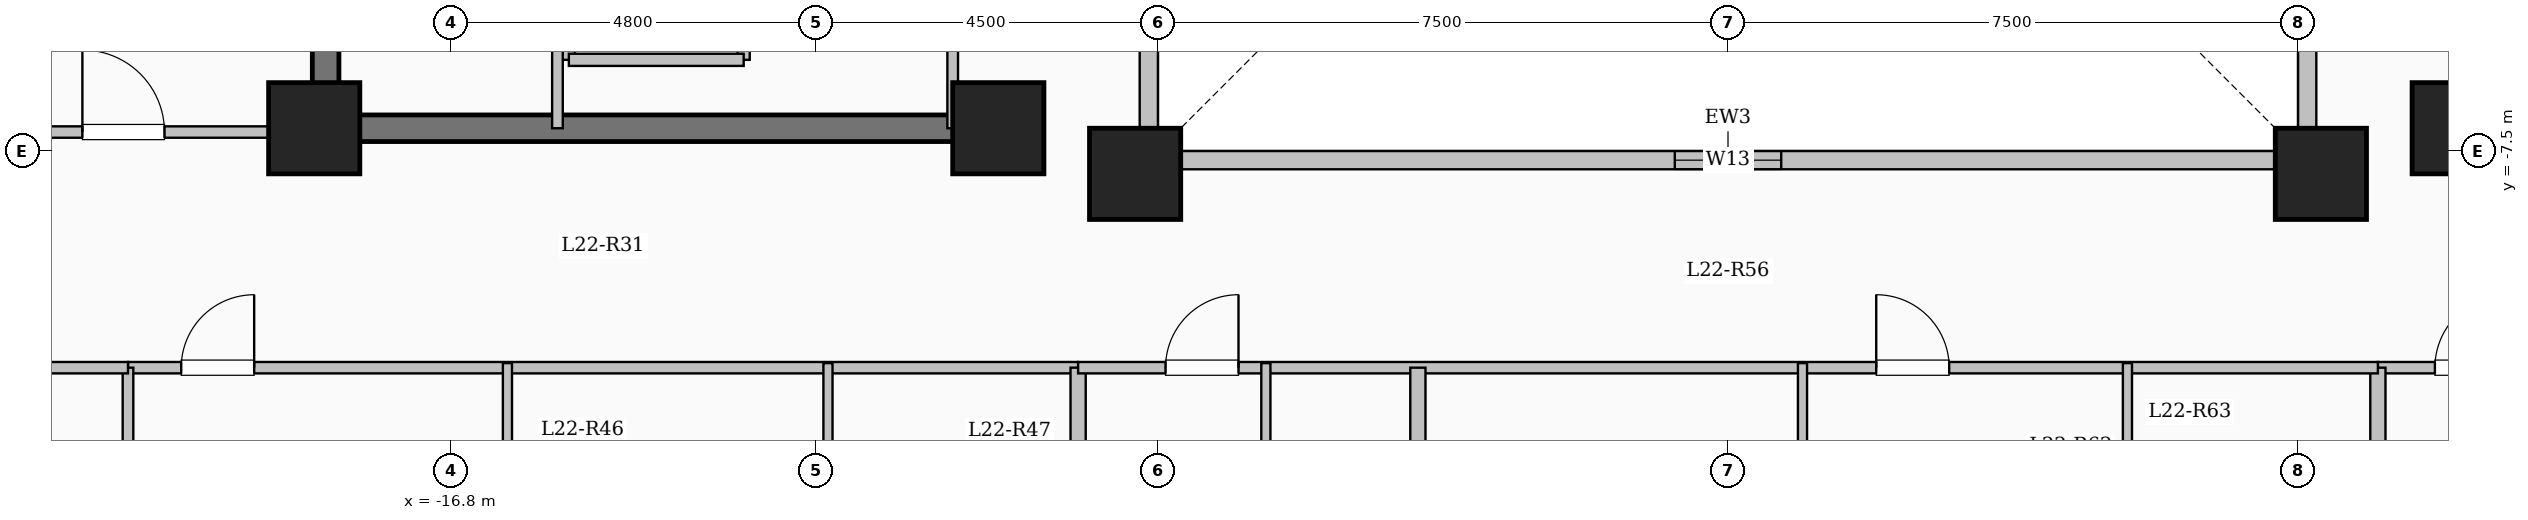
"""IFC4 building model, lengths in metres.
Left out: names, types, materials, properties, quantities, classifications, styles, units other than length and angle.
Written with IfcOpenShell. Run it as: python <this file> out.ifc"""

import sys

from ifc_helpers import new_model, si_unit, direction, frame, frame_2d, origin, origin_2d, place, context, subcontext, project, spatial, rectangle, extrude, element, fill, save


model = new_model("IFC4")
c1 = context("Model", 3, precision=1e-05, world=origin(), true_north=direction((0.0, 1.0)))
c2 = subcontext(c1, "Body", "Model", "MODEL_VIEW")
j1 = project(units=[si_unit("LENGTHUNIT", "METRE"), si_unit("PLANEANGLEUNIT", "RADIAN")], contexts=[c1])
p1 = place(None, origin())
s1 = spatial("IfcSite", under=j1, at=p1, CompositionType="ELEMENT")
p2 = place(p1, origin())
s2 = spatial("IfcBuilding", under=s1, at=p2, CompositionType="ELEMENT")
p3 = place(p2, frame((0.0, 0.0, 85.0)))
s3 = spatial("IfcBuildingStorey", under=s2, at=p3, CompositionType="ELEMENT", Elevation=85.0)
for number, where, z_axis, x_axis in (
    (1, (-7.8, -7.8, 0.0), (0.0, 0.0, 1.0), (1.0, 0.0, 0.0)),
    (2, (7.8, -7.8, 0.0), (0.0, 0.0, 1.0), (1.0, 0.0, 0.0)),
    (3, (-9.6, -7.2, 0.0), (0.0, 0.0, 1.0), (1.0, 0.0, 0.0)),
    (4, (9.6, -7.2, 0.0), (0.0, 0.0, 1.0), (1.0, 0.0, 0.0)),
    (5, (-18.6, -7.2, 0.0), (0.0, 0.0, 1.0), (1.0, 0.0, 0.0)),
):
    element("IfcColumn", number, at=place(p3, frame(where, z_axis=z_axis, x_axis=x_axis)), inside=s3, PredefinedType="COLUMN", context=c2, shape_type="SweptSolid", body=[
        extrude(rectangle(XDim=1.2, YDim=1.2, at=origin_2d()), origin(), (0.0, 0.0, 1.0), 3.35),
    ])
p4 = place(p3, frame((-7.62, -7.62, 0.0), z_axis=(0.0, 0.0, 1.0), x_axis=(1.0, 0.0, 0.0)))
e6 = element("IfcWall", 6, at=p4, inside=s3, PredefinedType="SOLIDWALL", context=c2, shape_type="SweptSolid", body=[
    extrude(rectangle(XDim=15.24, YDim=0.24, at=frame_2d((7.62, 0.0))), origin(), (0.0, 0.0, 1.0), 3.1),
])
p5 = place(p4, frame((6.92, 0.0, 0.95)))
e7 = element("IfcOpeningElement", 7, at=p5, cuts=e6, PredefinedType="OPENING", context=c2, shape_type="SweptSolid", body=[
    extrude(rectangle(XDim=1.4, YDim=1.5, at=frame_2d((0.7, 0.75))), frame((0.0, 0.13, 0.0), z_axis=(0.0, -1.0, 0.0), x_axis=(1.0, 0.0, 0.0)), (0.0, 0.0, 1.0), 0.26),
])
p6 = place(p3, frame((7.62, -7.62, 0.0), z_axis=(0.0, 0.0, 1.0), x_axis=(0.0, 1.0, 0.0)))
e8 = element("IfcWall", 8, at=p6, inside=s3, PredefinedType="SOLIDWALL", context=c2, shape_type="SweptSolid", body=[
    extrude(rectangle(XDim=15.24, YDim=0.24, at=frame_2d((7.62, 0.0))), origin(), (0.0, 0.0, 1.0), 3.1),
])
p7 = place(p6, frame((6.92, 0.0, 0.95)))
e9 = element("IfcOpeningElement", 9, at=p7, cuts=e8, PredefinedType="OPENING", context=c2, shape_type="SweptSolid", body=[
    extrude(rectangle(XDim=1.4, YDim=1.5, at=frame_2d((0.7, 0.75))), frame((0.0, 0.13, 0.0), z_axis=(0.0, -1.0, 0.0), x_axis=(1.0, 0.0, 0.0)), (0.0, 0.0, 1.0), 0.26),
])
p8 = place(p3, frame((-7.62, 7.62, 0.0), z_axis=(0.0, 0.0, 1.0), x_axis=(0.0, -1.0, 0.0)))
e10 = element("IfcWall", 10, at=p8, inside=s3, PredefinedType="SOLIDWALL", context=c2, shape_type="SweptSolid", body=[
    extrude(rectangle(XDim=15.24, YDim=0.24, at=frame_2d((7.62, 0.0))), origin(), (0.0, 0.0, 1.0), 3.1),
])
p9 = place(p8, frame((6.92, 0.0, 0.95)))
e11 = element("IfcOpeningElement", 11, at=p9, cuts=e10, PredefinedType="OPENING", context=c2, shape_type="SweptSolid", body=[
    extrude(rectangle(XDim=1.4, YDim=1.5, at=frame_2d((0.7, 0.75))), frame((0.0, 0.13, 0.0), z_axis=(0.0, -1.0, 0.0), x_axis=(1.0, 0.0, 0.0)), (0.0, 0.0, 1.0), 0.26),
])
for number, where, z_axis, x_axis in (
    (12, (-15.25, -6.3, 0.0), (0.0, 0.0, 1.0), (0.0, 1.0, 0.0)),
    (13, (-12.95, -6.3, 0.0), (0.0, 0.0, 1.0), (0.0, 1.0, 0.0)),
):
    element("IfcWall", number, at=place(p3, frame(where, z_axis=z_axis, x_axis=x_axis)), inside=s3, PredefinedType="SOLIDWALL", context=c2, shape_type="SweptSolid", body=[
        extrude(rectangle(XDim=2.6, YDim=0.16, at=frame_2d((1.3, 0.0))), origin(), (0.0, 0.0, 1.0), 3.1),
    ])
p10 = place(p3, frame((-15.25, -6.3, 0.0), z_axis=(0.0, 0.0, 1.0), x_axis=(1.0, 0.0, 0.0)))
e14 = element("IfcWall", 14, at=p10, inside=s3, PredefinedType="SOLIDWALL", context=c2, shape_type="SweptSolid", body=[
    extrude(rectangle(XDim=2.3, YDim=0.16, at=frame_2d((1.15, 0.0))), origin(), (0.0, 0.0, 1.0), 3.1),
])
p11 = place(p3, frame((-18.45, -7.375, 0.0), z_axis=(0.0, 0.0, 1.0), x_axis=(0.0, 1.0, 0.0)))
e15 = element("IfcWall", 15, at=p11, inside=s3, PredefinedType="SHEAR", context=c2, shape_type="SweptSolid", body=[
    extrude(rectangle(XDim=14.05, YDim=0.35, at=frame_2d((7.025, 0.0))), origin(), (0.0, 0.0, 1.0), 3.35),
])
p12 = place(p3, frame((-18.625, -7.2, 0.0), z_axis=(0.0, 0.0, 1.0), x_axis=(1.0, 0.0, 0.0)))
e16 = element("IfcWall", 16, at=p12, inside=s3, PredefinedType="SHEAR", context=c2, shape_type="SweptSolid", body=[
    extrude(rectangle(XDim=8.55, YDim=0.35, at=frame_2d((4.275, 0.0))), origin(), (0.0, 0.0, 1.0), 3.35),
])
p13 = place(p3, frame((-15.4, -7.2, 0.0), z_axis=(0.0, 0.0, 1.0), x_axis=(0.0, 1.0, 0.0)))
e17 = element("IfcWall", 17, at=p13, inside=s3, PredefinedType="PARTITIONING", context=c2, shape_type="SweptSolid", body=[
    extrude(rectangle(XDim=10.45, YDim=0.14, at=frame_2d((5.225, 0.0))), origin(), (0.0, 0.0, 1.0), 3.1),
])
p14 = place(p13, frame((9.25, 0.0, 0.0)))
e18 = element("IfcOpeningElement", 18, at=p14, cuts=e17, PredefinedType="OPENING", context=c2, shape_type="SweptSolid", body=[
    extrude(rectangle(XDim=0.9, YDim=2.08, at=frame_2d((0.45, 1.04))), frame((0.0, 0.08, 0.0), z_axis=(0.0, -1.0, 0.0), x_axis=(1.0, 0.0, 0.0)), (0.0, 0.0, 1.0), 0.16),
])
p15 = place(p3, frame((-10.2, -7.2, 0.0), z_axis=(0.0, 0.0, 1.0), x_axis=(0.0, 1.0, 0.0)))
e19 = element("IfcWall", 19, at=p15, inside=s3, PredefinedType="PARTITIONING", context=c2, shape_type="SweptSolid", body=[
    extrude(rectangle(XDim=9.12, YDim=0.14, at=frame_2d((4.56, 0.0))), origin(), (0.0, 0.0, 1.0), 3.1),
])
p16 = place(p15, frame((1.9, 0.0, 0.0)))
e20 = element("IfcOpeningElement", 20, at=p16, cuts=e19, PredefinedType="OPENING", context=c2, shape_type="SweptSolid", body=[
    extrude(rectangle(XDim=0.95, YDim=2.12, at=frame_2d((0.475, 1.06))), frame((0.0, 0.08, 0.0), z_axis=(0.0, -1.0, 0.0), x_axis=(1.0, 0.0, 0.0)), (0.0, 0.0, 1.0), 0.16),
])
p17 = place(p15, frame((6.6, 0.0, 0.0)))
e21 = element("IfcOpeningElement", 21, at=p17, cuts=e19, PredefinedType="OPENING", context=c2, shape_type="SweptSolid", body=[
    extrude(rectangle(XDim=0.95, YDim=2.12, at=frame_2d((0.475, 1.06))), frame((0.0, 0.08, 0.0), z_axis=(0.0, -1.0, 0.0), x_axis=(1.0, 0.0, 0.0)), (0.0, 0.0, 1.0), 0.16),
])
p18 = place(p3, frame((-21.05, -10.35, 0.0), z_axis=(0.0, 0.0, 1.0), x_axis=(1.0, 0.0, 0.0)))
e22 = element("IfcWall", 22, at=p18, inside=s3, PredefinedType="PARTITIONING", context=c2, shape_type="SweptSolid", body=[
    extrude(rectangle(XDim=12.5, YDim=0.15, at=frame_2d((6.25, 0.0))), origin(), (0.0, 0.0, 1.0), 3.1),
])
p19 = place(p18, frame((0.7, 0.0, 0.0)))
e23 = element("IfcOpeningElement", 23, at=p19, cuts=e22, PredefinedType="OPENING", context=c2, shape_type="SweptSolid", body=[
    extrude(rectangle(XDim=0.96, YDim=2.15, at=frame_2d((0.48, 1.075))), frame((0.0, 0.085, 0.0), z_axis=(0.0, -1.0, 0.0), x_axis=(1.0, 0.0, 0.0)), (0.0, 0.0, 1.0), 0.17),
])
p20 = place(p3, frame((8.55, -10.35, 0.0), z_axis=(0.0, 0.0, 1.0), x_axis=(1.0, 0.0, 0.0)))
e24 = element("IfcWall", 24, at=p20, inside=s3, PredefinedType="PARTITIONING", context=c2, shape_type="SweptSolid", body=[
    extrude(rectangle(XDim=12.5, YDim=0.15, at=frame_2d((6.25, 0.0))), origin(), (0.0, 0.0, 1.0), 3.1),
])
p21 = place(p20, frame((0.75, 0.0, 0.0)))
e25 = element("IfcOpeningElement", 25, at=p21, cuts=e24, PredefinedType="OPENING", context=c2, shape_type="SweptSolid", body=[
    extrude(rectangle(XDim=0.96, YDim=2.15, at=frame_2d((0.48, 1.075))), frame((0.0, 0.085, 0.0), z_axis=(0.0, -1.0, 0.0), x_axis=(1.0, 0.0, 0.0)), (0.0, 0.0, 1.0), 0.17),
])
p22 = place(p3, frame((-16.058, -22.1, 0.0), z_axis=(0.0, 0.0, 1.0), x_axis=(0.0, 1.0, 0.0)))
e26 = element("IfcWall", 26, at=p22, inside=s3, PredefinedType="PARTITIONING", context=c2, shape_type="SweptSolid", body=[
    extrude(rectangle(XDim=11.81, YDim=0.12, at=frame_2d((5.905, 0.0))), origin(), (0.0, 0.0, 1.0), 3.1),
])
p23 = place(p22, frame((7.645, 0.0, 0.0)))
e27 = element("IfcOpeningElement", 27, at=p23, cuts=e26, PredefinedType="OPENING", context=c2, shape_type="SweptSolid", body=[
    extrude(rectangle(XDim=1.08, YDim=2.15, at=frame_2d((0.54, 1.075))), frame((0.0, 0.07, 0.0), z_axis=(0.0, -1.0, 0.0), x_axis=(1.0, 0.0, 0.0)), (0.0, 0.0, 1.0), 0.14),
])
p24 = place(p3, frame((-11.841, -13.09, 0.0), z_axis=(0.0, 0.0, 1.0), x_axis=(0.0, 1.0, 0.0)))
e28 = element("IfcWall", 28, at=p24, inside=s3, PredefinedType="PARTITIONING", context=c2, shape_type="SweptSolid", body=[
    extrude(rectangle(XDim=2.8, YDim=0.12, at=frame_2d((1.4, 0.0))), origin(), (0.0, 0.0, 1.0), 3.1),
])
for number, where, z_axis, x_axis in (
    (29, (-8.55, -22.704, 0.0), (0.0, 0.0, 1.0), (0.0, 1.0, 0.0)),
    (30, (8.55, -22.704, 0.0), (0.0, 0.0, 1.0), (0.0, 1.0, 0.0)),
):
    element("IfcWall", number, at=place(p3, frame(where, z_axis=z_axis, x_axis=x_axis)), inside=s3, PredefinedType="SOLIDWALL", context=c2, shape_type="SweptSolid", body=[
        extrude(rectangle(XDim=12.354, YDim=0.2, at=frame_2d((6.177, 0.0))), origin(), (0.0, 0.0, 1.0), 3.1),
    ])
p25 = place(p3, frame((-8.55, -10.35, 0.0), z_axis=(0.0, 0.0, 1.0), x_axis=(1.0, 0.0, 0.0)))
e31 = element("IfcWall", 31, at=p25, inside=s3, PredefinedType="PARTITIONING", context=c2, shape_type="SweptSolid", body=[
    extrude(rectangle(XDim=17.1, YDim=0.15, at=frame_2d((8.55, 0.0))), origin(), (0.0, 0.0, 1.0), 3.1),
])
p26 = place(p25, frame((1.15, 0.0, 0.0)))
e32 = element("IfcOpeningElement", 32, at=p26, cuts=e31, PredefinedType="OPENING", context=c2, shape_type="SweptSolid", body=[
    extrude(rectangle(XDim=0.96, YDim=2.15, at=frame_2d((0.48, 1.075))), frame((0.0, 0.085, 0.0), z_axis=(0.0, -1.0, 0.0), x_axis=(1.0, 0.0, 0.0)), (0.0, 0.0, 1.0), 0.17),
])
p27 = place(p25, frame((10.5, 0.0, 0.0)))
e33 = element("IfcOpeningElement", 33, at=p27, cuts=e31, PredefinedType="OPENING", context=c2, shape_type="SweptSolid", body=[
    extrude(rectangle(XDim=0.96, YDim=2.15, at=frame_2d((0.48, 1.075))), frame((0.0, 0.085, 0.0), z_axis=(0.0, -1.0, 0.0), x_axis=(1.0, 0.0, 0.0)), (0.0, 0.0, 1.0), 0.17),
])
p28 = place(p3, frame((-4.08, -22.05, 0.0), z_axis=(0.0, 0.0, 1.0), x_axis=(0.0, 1.0, 0.0)))
e34 = element("IfcWall", 34, at=p28, inside=s3, PredefinedType="SOLIDWALL", context=c2, shape_type="SweptSolid", body=[
    extrude(rectangle(XDim=11.7, YDim=0.2, at=frame_2d((5.85, 0.0))), origin(), (0.0, 0.0, 1.0), 3.1),
])
p29 = place(p3, frame((-6.08, -13.51, 0.0), z_axis=(0.0, 0.0, 1.0), x_axis=(0.0, 1.0, 0.0)))
e35 = element("IfcWall", 35, at=p29, inside=s3, PredefinedType="PARTITIONING", context=c2, shape_type="SweptSolid", body=[
    extrude(rectangle(XDim=3.22, YDim=0.12, at=frame_2d((1.61, 0.0))), origin(), (0.0, 0.0, 1.0), 3.1),
])
p30 = place(p29, frame((1.14, 0.0, 0.0)))
e36 = element("IfcOpeningElement", 36, at=p30, cuts=e35, PredefinedType="OPENING", context=c2, shape_type="SweptSolid", body=[
    extrude(rectangle(XDim=0.88, YDim=2.1, at=frame_2d((0.44, 1.05))), frame((0.0, 0.07, 0.0), z_axis=(0.0, -1.0, 0.0), x_axis=(1.0, 0.0, 0.0)), (0.0, 0.0, 1.0), 0.14),
])
p31 = place(p3, frame((0.98, -23.58, 0.0), z_axis=(0.0, 0.0, 1.0), x_axis=(0.0, 1.0, 0.0)))
e37 = element("IfcWall", 37, at=p31, inside=s3, PredefinedType="PARTITIONING", context=c2, shape_type="SweptSolid", body=[
    extrude(rectangle(XDim=13.29, YDim=0.12, at=frame_2d((6.645, 0.0))), origin(), (0.0, 0.0, 1.0), 3.1),
])
p32 = place(p31, frame((9.295, 0.0, 0.0)))
e38 = element("IfcOpeningElement", 38, at=p32, cuts=e37, PredefinedType="OPENING", context=c2, shape_type="SweptSolid", body=[
    extrude(rectangle(XDim=1.08, YDim=2.15, at=frame_2d((0.54, 1.075))), frame((0.0, 0.07, 0.0), z_axis=(0.0, -1.0, 0.0), x_axis=(1.0, 0.0, 0.0)), (0.0, 0.0, 1.0), 0.14),
])
p33 = place(p3, frame((5.255, -12.92, 0.0), z_axis=(0.0, 0.0, 1.0), x_axis=(0.0, 1.0, 0.0)))
e39 = element("IfcWall", 39, at=p33, inside=s3, PredefinedType="PARTITIONING", context=c2, shape_type="SweptSolid", body=[
    extrude(rectangle(XDim=2.63, YDim=0.12, at=frame_2d((1.315, 0.0))), origin(), (0.0, 0.0, 1.0), 3.1),
])
p34 = place(p3, frame((-26.88, -7.25, 0.0), z_axis=(0.0, 0.0, 1.0), x_axis=(1.0, 0.0, 0.0)))
e40 = element("IfcWall", 40, at=p34, inside=s3, PredefinedType="PARTITIONING", context=c2, shape_type="SweptSolid", body=[
    extrude(rectangle(XDim=8.43, YDim=0.15, at=frame_2d((4.215, 0.0))), origin(), (0.0, 0.0, 1.0), 3.1),
])
p35 = place(p34, frame((5.23, 0.0, 0.0)))
e41 = element("IfcOpeningElement", 41, at=p35, cuts=e40, PredefinedType="OPENING", context=c2, shape_type="SweptSolid", body=[
    extrude(rectangle(XDim=1.08, YDim=2.15, at=frame_2d((0.54, 1.075))), frame((0.0, 0.085, 0.0), z_axis=(0.0, -1.0, 0.0), x_axis=(1.0, 0.0, 0.0)), (0.0, 0.0, 1.0), 0.17),
])
p36 = place(p3, frame((-21.05, -17.85, 0.0), z_axis=(0.0, 0.0, 1.0), x_axis=(0.0, 1.0, 0.0)))
e42 = element("IfcWall", 42, at=p36, inside=s3, PredefinedType="PARTITIONING", context=c2, shape_type="SweptSolid", body=[
    extrude(rectangle(XDim=7.5, YDim=0.14, at=frame_2d((3.75, 0.0))), origin(), (0.0, 0.0, 1.0), 3.1),
])
p37 = place(p3, frame((-26.88, -10.35, 0.0), z_axis=(0.0, 0.0, 1.0), x_axis=(1.0, 0.0, 0.0)))
e43 = element("IfcWall", 43, at=p37, inside=s3, PredefinedType="PARTITIONING", context=c2, shape_type="SweptSolid", body=[
    extrude(rectangle(XDim=5.83, YDim=0.15, at=frame_2d((2.915, 0.0))), origin(), (0.0, 0.0, 1.0), 3.1),
])
p38 = place(p37, frame((2.44, 0.0, 0.0)))
e44 = element("IfcOpeningElement", 44, at=p38, cuts=e43, PredefinedType="OPENING", context=c2, shape_type="SweptSolid", body=[
    extrude(rectangle(XDim=0.95, YDim=2.15, at=frame_2d((0.475, 1.075))), frame((0.0, 0.085, 0.0), z_axis=(0.0, -1.0, 0.0), x_axis=(1.0, 0.0, 0.0)), (0.0, 0.0, 1.0), 0.17),
])
p39 = place(p5, origin())
e45 = element("IfcWindow", 45, at=p39, inside=s3, PartitioningType="SINGLE_PANEL", PredefinedType="WINDOW", context=c2, shape_type="SweptSolid", body=[
    extrude(rectangle(XDim=1.4, YDim=1.5, at=frame_2d((0.7, 0.75))), frame((0.0, 0.03, 0.0), z_axis=(0.0, -1.0, 0.0), x_axis=(1.0, 0.0, 0.0)), (0.0, 0.0, 1.0), 0.06),
])
fill(e7, e45)
p40 = place(p19, origin())
e46 = element("IfcDoor", 46, at=p40, inside=s3, OperationType="SINGLE_SWING_RIGHT", PredefinedType="DOOR", context=c2, shape_type="SweptSolid", body=[
    extrude(rectangle(XDim=0.96, YDim=2.15, at=frame_2d((0.48, 1.075))), frame((0.0, 0.025, 0.0), z_axis=(0.0, -1.0, 0.0), x_axis=(1.0, 0.0, 0.0)), (0.0, 0.0, 1.0), 0.05),
])
fill(e23, e46)
p41 = place(p21, origin())
e47 = element("IfcDoor", 47, at=p41, inside=s3, OperationType="SINGLE_SWING_RIGHT", PredefinedType="DOOR", context=c2, shape_type="SweptSolid", body=[
    extrude(rectangle(XDim=0.96, YDim=2.15, at=frame_2d((0.48, 1.075))), frame((0.0, 0.025, 0.0), z_axis=(0.0, -1.0, 0.0), x_axis=(1.0, 0.0, 0.0)), (0.0, 0.0, 1.0), 0.05),
])
fill(e25, e47)
p42 = place(p26, origin())
e48 = element("IfcDoor", 48, at=p42, inside=s3, OperationType="SINGLE_SWING_RIGHT", PredefinedType="DOOR", context=c2, shape_type="SweptSolid", body=[
    extrude(rectangle(XDim=0.96, YDim=2.15, at=frame_2d((0.48, 1.075))), frame((0.0, 0.025, 0.0), z_axis=(0.0, -1.0, 0.0), x_axis=(1.0, 0.0, 0.0)), (0.0, 0.0, 1.0), 0.05),
])
fill(e32, e48)
p43 = place(p27, origin())
e49 = element("IfcDoor", 49, at=p43, inside=s3, OperationType="SINGLE_SWING_LEFT", PredefinedType="DOOR", context=c2, shape_type="SweptSolid", body=[
    extrude(rectangle(XDim=0.96, YDim=2.15, at=frame_2d((0.48, 1.075))), frame((0.0, 0.025, 0.0), z_axis=(0.0, -1.0, 0.0), x_axis=(1.0, 0.0, 0.0)), (0.0, 0.0, 1.0), 0.05),
])
fill(e33, e49)
p44 = place(p35, origin())
e50 = element("IfcDoor", 50, at=p44, inside=s3, OperationType="SINGLE_SWING_LEFT", PredefinedType="DOOR", context=c2, shape_type="SweptSolid", body=[
    extrude(rectangle(XDim=1.08, YDim=2.15, at=frame_2d((0.54, 1.075))), frame((0.0, 0.025, 0.0), z_axis=(0.0, -1.0, 0.0), x_axis=(1.0, 0.0, 0.0)), (0.0, 0.0, 1.0), 0.05),
])
fill(e41, e50)
save(model, sys.argv[1])
